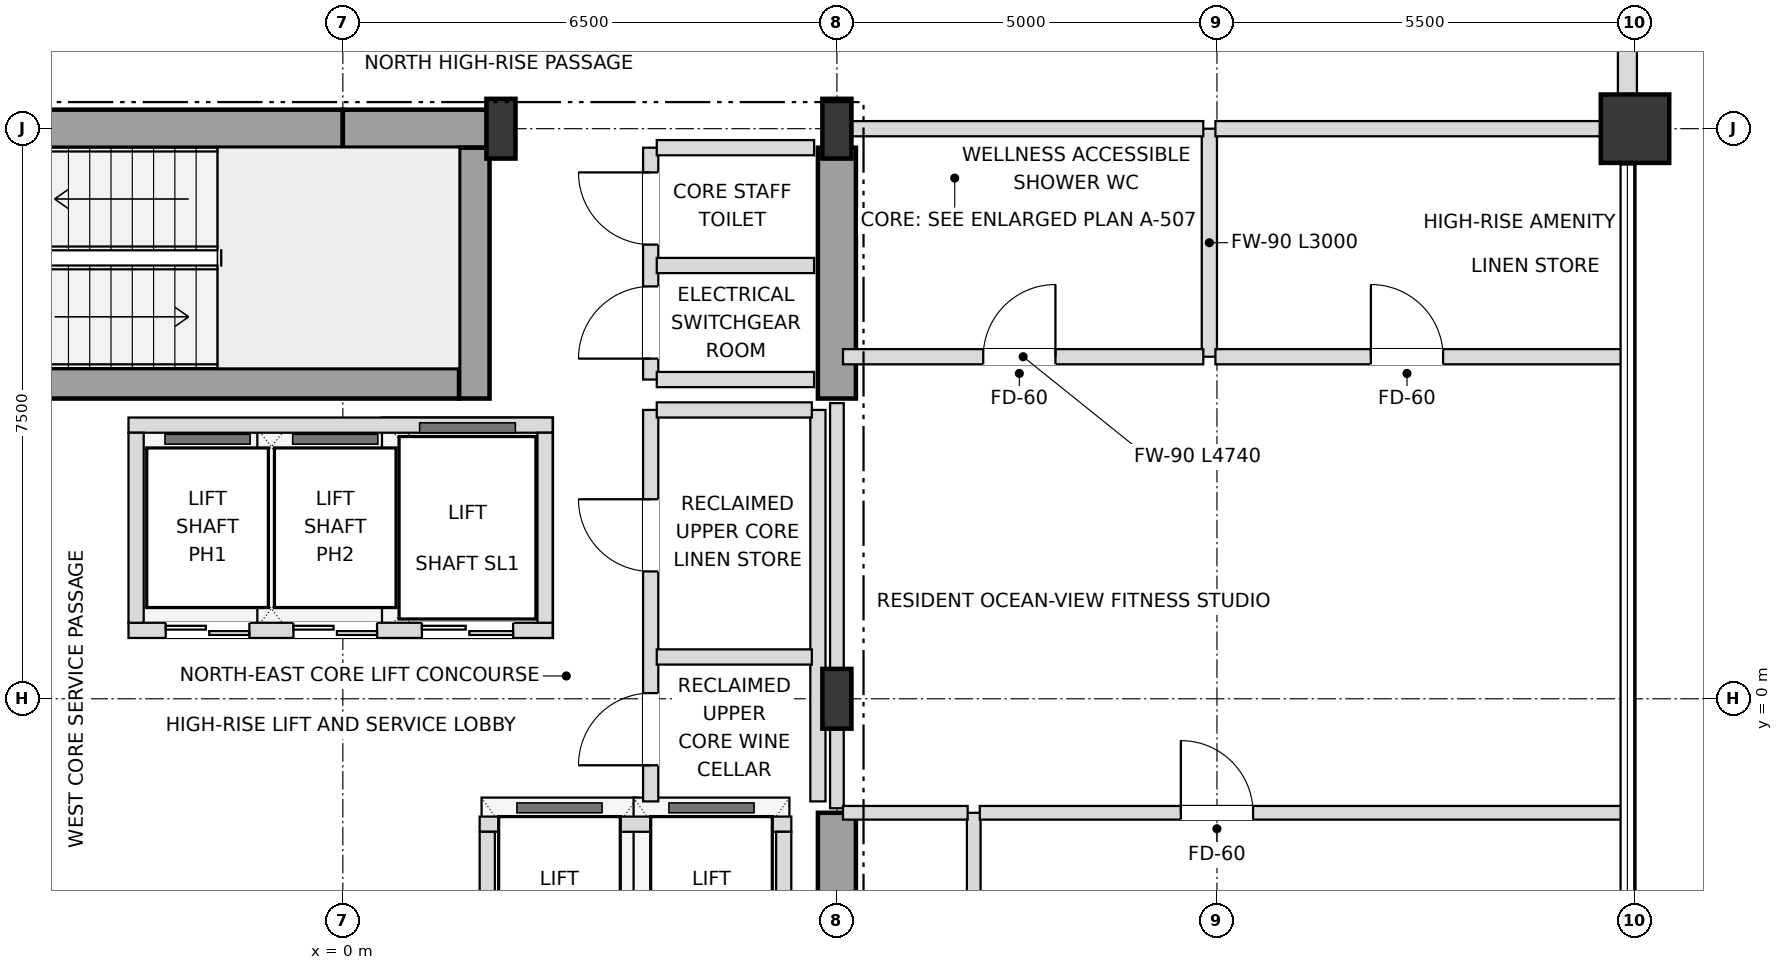
"""IFC4 building model, lengths in metres.
Left out: names, types, materials, properties, quantities, classifications, styles, units other than length and angle.
Written with IfcOpenShell. Run it as: python <this file> out.ifc"""

import sys

from ifc_helpers import new_model, si_unit, direction, frame, frame_2d, origin, origin_2d, place, context, subcontext, project, spatial, rectangle, i_section, extrude, element, fill, save


model = new_model("IFC4")
c1 = context("Model", 3, precision=1e-05, world=origin(), true_north=direction((0.0, 1.0)))
c2 = subcontext(c1, "Body", "Model", "MODEL_VIEW")
j1 = project(units=[si_unit("LENGTHUNIT", "METRE"), si_unit("PLANEANGLEUNIT", "RADIAN")], contexts=[c1])
p1 = place(None, origin())
s1 = spatial("IfcSite", under=j1, at=p1, CompositionType="ELEMENT")
p2 = place(p1, origin())
s2 = spatial("IfcBuilding", under=s1, at=p2, CompositionType="ELEMENT")
p3 = place(p2, frame((0.0, 0.0, 269.1)))
s3 = spatial("IfcBuildingStorey", under=s2, at=p3, CompositionType="ELEMENT", Elevation=269.1)
for number, where, z_axis, x_axis in (
    (1, (6.5, 0.0, 0.0), (0.0, 0.0, 1.0), (1.0, 0.0, 0.0)),
    (2, (2.08, 7.5, 0.0), (0.0, 0.0, 1.0), (1.0, 0.0, 0.0)),
    (3, (6.5, 7.5, 0.0), (0.0, 0.0, 1.0), (1.0, 0.0, 0.0)),
):
    element("IfcColumn", number, at=place(p3, frame(where, z_axis=z_axis, x_axis=x_axis)), inside=s3, PredefinedType="COLUMN", context=c2, shape_type="SweptSolid", body=[
        extrude(i_section(OverallWidth=0.382, OverallDepth=0.786, WebThickness=0.02, FlangeThickness=0.033, at=origin_2d()), origin(), (0.0, 0.0, 1.0), 3.6),
    ])
p4 = place(p3, frame((17.0, 7.5, 0.0), z_axis=(0.0, 0.0, 1.0), x_axis=(1.0, 0.0, 0.0)))
e4 = element("IfcColumn", 4, at=p4, inside=s3, PredefinedType="USERDEFINED", context=c2, shape_type="SweptSolid", body=[
    extrude(rectangle(XDim=0.9, YDim=0.9, at=origin_2d()), origin(), (0.0, 0.0, 1.0), 3.6),
])
p5 = place(p3, frame((16.9, 7.945, 0.0), z_axis=(0.0, 0.0, 1.0), x_axis=(0.0, 1.0, 0.0)))
e5 = element("IfcWall", 5, at=p5, inside=s3, PredefinedType="SOLIDWALL", context=c2, shape_type="SweptSolid", body=[
    extrude(rectangle(XDim=4.61, YDim=0.25, at=frame_2d((2.305, 0.0))), origin(), (0.0, 0.0, 1.0), 2.748),
])
p6 = place(p5, frame((1.405, 0.0, 0.72)))
e6 = element("IfcOpeningElement", 6, at=p6, cuts=e5, PredefinedType="OPENING", context=c2, shape_type="SweptSolid", body=[
    extrude(rectangle(XDim=1.8, YDim=1.68, at=frame_2d((0.9, 0.84))), frame((0.0, 0.135, 0.0), z_axis=(0.0, -1.0, 0.0), x_axis=(1.0, 0.0, 0.0)), (0.0, 0.0, 1.0), 0.27),
])
p7 = place(p3, frame((-6.75, 7.5, 0.0), z_axis=(0.0, 0.0, 1.0), x_axis=(1.0, 0.0, 0.0)))
e7 = element("IfcWall", 7, at=p7, inside=s3, PredefinedType="SHEAR", context=c2, shape_type="SweptSolid", body=[
    extrude(rectangle(XDim=6.75, YDim=0.5, at=frame_2d((3.375, 0.0))), origin(), (0.0, 0.0, 1.0), 3.38),
])
p8 = place(p7, frame((1.65, 0.0, 0.0)))
e8 = element("IfcOpeningElement", 8, at=p8, cuts=e7, PredefinedType="OPENING", context=c2, shape_type="SweptSolid", body=[
    extrude(rectangle(XDim=1.05, YDim=2.15, at=frame_2d((0.525, 1.075))), frame((0.0, 0.26, 0.0), z_axis=(0.0, -1.0, 0.0), x_axis=(1.0, 0.0, 0.0)), (0.0, 0.0, 1.0), 0.52),
])
p9 = place(p3, frame((0.0, 7.5, 0.0), z_axis=(0.0, 0.0, 1.0), x_axis=(1.0, 0.0, 0.0)))
e9 = element("IfcWall", 9, at=p9, inside=s3, PredefinedType="SHEAR", context=c2, shape_type="SweptSolid", body=[
    extrude(rectangle(XDim=2.08, YDim=0.5, at=frame_2d((1.04, 0.0))), origin(), (0.0, 0.0, 1.0), 3.38),
])
p10 = place(p3, frame((6.5, -7.25, 0.0), z_axis=(0.0, 0.0, 1.0), x_axis=(0.0, 1.0, 0.0)))
e10 = element("IfcWall", 10, at=p10, inside=s3, PredefinedType="SHEAR", context=c2, shape_type="SweptSolid", body=[
    extrude(rectangle(XDim=5.75, YDim=0.5, at=frame_2d((2.875, 0.0))), origin(), (0.0, 0.0, 1.0), 3.38),
])
p11 = place(p10, frame((0.85, 0.0, 0.0)))
e11 = element("IfcOpeningElement", 11, at=p11, cuts=e10, PredefinedType="OPENING", context=c2, shape_type="SweptSolid", body=[
    extrude(rectangle(XDim=1.05, YDim=2.15, at=frame_2d((0.525, 1.075))), frame((0.0, 0.26, 0.0), z_axis=(0.0, -1.0, 0.0), x_axis=(1.0, 0.0, 0.0)), (0.0, 0.0, 1.0), 0.52),
])
p12 = place(p3, frame((6.5, 3.95, 0.0), z_axis=(0.0, 0.0, 1.0), x_axis=(0.0, 1.0, 0.0)))
e12 = element("IfcWall", 12, at=p12, inside=s3, PredefinedType="SHEAR", context=c2, shape_type="SweptSolid", body=[
    extrude(rectangle(XDim=3.3, YDim=0.5, at=frame_2d((1.65, 0.0))), origin(), (0.0, 0.0, 1.0), 3.38),
])
p13 = place(p3, frame((-5.55, 4.15, 0.0), z_axis=(0.0, 0.0, 1.0), x_axis=(1.0, 0.0, 0.0)))
e13 = element("IfcWall", 13, at=p13, inside=s3, PredefinedType="SHEAR", context=c2, shape_type="SweptSolid", body=[
    extrude(rectangle(XDim=7.08, YDim=0.4, at=frame_2d((3.54, 0.0))), origin(), (0.0, 0.0, 1.0), 3.38),
])
p14 = place(p3, frame((1.73, 3.95, 0.0), z_axis=(0.0, 0.0, 1.0), x_axis=(0.0, 1.0, 0.0)))
e14 = element("IfcWall", 14, at=p14, inside=s3, PredefinedType="SHEAR", context=c2, shape_type="SweptSolid", body=[
    extrude(rectangle(XDim=3.3, YDim=0.4, at=frame_2d((1.65, 0.0))), origin(), (0.0, 0.0, 1.0), 3.38),
])
p15 = place(p3, frame((-2.82, 0.9, 0.0), z_axis=(0.0, 0.0, 1.0), x_axis=(1.0, 0.0, 0.0)))
e15 = element("IfcWall", 15, at=p15, inside=s3, PredefinedType="SOLIDWALL", context=c2, shape_type="SweptSolid", body=[
    extrude(rectangle(XDim=5.58, YDim=0.2, at=frame_2d((2.79, 0.0))), origin(), (0.0, 0.0, 1.0), 3.38),
])
p16 = place(p15, frame((0.49, 0.0, 0.0)))
e16 = element("IfcOpeningElement", 16, at=p16, cuts=e15, PredefinedType="OPENING", context=c2, shape_type="SweptSolid", body=[
    extrude(rectangle(XDim=1.1, YDim=2.15, at=frame_2d((0.55, 1.075))), frame((0.0, 0.11, 0.0), z_axis=(0.0, -1.0, 0.0), x_axis=(1.0, 0.0, 0.0)), (0.0, 0.0, 1.0), 0.22),
])
p17 = place(p15, frame((2.17, 0.0, 0.0)))
e17 = element("IfcOpeningElement", 17, at=p17, cuts=e15, PredefinedType="OPENING", context=c2, shape_type="SweptSolid", body=[
    extrude(rectangle(XDim=1.1, YDim=2.15, at=frame_2d((0.55, 1.075))), frame((0.0, 0.11, 0.0), z_axis=(0.0, -1.0, 0.0), x_axis=(1.0, 0.0, 0.0)), (0.0, 0.0, 1.0), 0.22),
])
p18 = place(p15, frame((3.86, 0.0, 0.0)))
e18 = element("IfcOpeningElement", 18, at=p18, cuts=e15, PredefinedType="OPENING", context=c2, shape_type="SweptSolid", body=[
    extrude(rectangle(XDim=1.2, YDim=2.2, at=frame_2d((0.6, 1.1))), frame((0.0, 0.11, 0.0), z_axis=(0.0, -1.0, 0.0), x_axis=(1.0, 0.0, 0.0)), (0.0, 0.0, 1.0), 0.22),
])
p19 = place(p3, frame((-2.82, 3.6, 0.0), z_axis=(0.0, 0.0, 1.0), x_axis=(1.0, 0.0, 0.0)))
e19 = element("IfcWall", 19, at=p19, inside=s3, PredefinedType="SOLIDWALL", context=c2, shape_type="SweptSolid", body=[
    extrude(rectangle(XDim=5.58, YDim=0.2, at=frame_2d((2.79, 0.0))), origin(), (0.0, 0.0, 1.0), 3.38),
])
for number, where, z_axis, x_axis in (
    (20, (-2.72, 1.0, 0.0), (0.0, 0.0, 1.0), (0.0, 1.0, 0.0)),
    (21, (2.66, 1.0, 0.0), (0.0, 0.0, 1.0), (0.0, 1.0, 0.0)),
):
    element("IfcWall", number, at=place(p3, frame(where, z_axis=z_axis, x_axis=x_axis)), inside=s3, PredefinedType="SOLIDWALL", context=c2, shape_type="SweptSolid", body=[
        extrude(rectangle(XDim=2.5, YDim=0.2, at=frame_2d((1.25, 0.0))), origin(), (0.0, 0.0, 1.0), 3.38),
    ])
p20 = place(p3, frame((1.8, -1.65, 0.0), z_axis=(0.0, 0.0, 1.0), x_axis=(1.0, 0.0, 0.0)))
e22 = element("IfcWall", 22, at=p20, inside=s3, PredefinedType="SOLIDWALL", context=c2, shape_type="SweptSolid", body=[
    extrude(rectangle(XDim=4.1, YDim=0.2, at=frame_2d((2.05, 0.0))), origin(), (0.0, 0.0, 1.0), 3.38),
])
for number, where, z_axis, x_axis in (
    (23, (1.9, -3.75, 0.0), (0.0, 0.0, 1.0), (0.0, 1.0, 0.0)),
    (24, (5.8, -3.75, 0.0), (0.0, 0.0, 1.0), (0.0, 1.0, 0.0)),
):
    element("IfcWall", number, at=place(p3, frame(where, z_axis=z_axis, x_axis=x_axis)), inside=s3, PredefinedType="SOLIDWALL", context=c2, shape_type="SweptSolid", body=[
        extrude(rectangle(XDim=2.0, YDim=0.2, at=frame_2d((1.0, 0.0))), origin(), (0.0, 0.0, 1.0), 3.38),
    ])
p21 = place(p3, frame((4.05, -1.35, 0.0), z_axis=(0.0, 0.0, 1.0), x_axis=(0.0, 1.0, 0.0)))
e25 = element("IfcWall", 25, at=p21, inside=s3, PredefinedType="SOLIDWALL", context=c2, shape_type="SweptSolid", body=[
    extrude(rectangle(XDim=5.15, YDim=0.2, at=frame_2d((2.575, 0.0))), origin(), (0.0, 0.0, 1.0), 3.38),
])
p22 = place(p21, frame((0.475, 0.0, 0.0)))
e26 = element("IfcOpeningElement", 26, at=p22, cuts=e25, PredefinedType="OPENING", context=c2, shape_type="SweptSolid", body=[
    extrude(rectangle(XDim=0.95, YDim=2.15, at=frame_2d((0.475, 1.075))), frame((0.0, 0.11, 0.0), z_axis=(0.0, -1.0, 0.0), x_axis=(1.0, 0.0, 0.0)), (0.0, 0.0, 1.0), 0.22),
])
p23 = place(p21, frame((3.025, 0.0, 0.0)))
e27 = element("IfcOpeningElement", 27, at=p23, cuts=e25, PredefinedType="OPENING", context=c2, shape_type="SweptSolid", body=[
    extrude(rectangle(XDim=0.95, YDim=2.15, at=frame_2d((0.475, 1.075))), frame((0.0, 0.11, 0.0), z_axis=(0.0, -1.0, 0.0), x_axis=(1.0, 0.0, 0.0)), (0.0, 0.0, 1.0), 0.22),
])
p24 = place(p3, frame((4.05, 4.2, 0.0), z_axis=(0.0, 0.0, 1.0), x_axis=(0.0, 1.0, 0.0)))
e28 = element("IfcWall", 28, at=p24, inside=s3, PredefinedType="SOLIDWALL", context=c2, shape_type="SweptSolid", body=[
    extrude(rectangle(XDim=3.05, YDim=0.2, at=frame_2d((1.525, 0.0))), origin(), (0.0, 0.0, 1.0), 3.38),
])
p25 = place(p24, frame((0.275, 0.0, 0.0)))
e29 = element("IfcOpeningElement", 29, at=p25, cuts=e28, PredefinedType="OPENING", context=c2, shape_type="SweptSolid", body=[
    extrude(rectangle(XDim=0.95, YDim=2.15, at=frame_2d((0.475, 1.075))), frame((0.0, 0.11, 0.0), z_axis=(0.0, -1.0, 0.0), x_axis=(1.0, 0.0, 0.0)), (0.0, 0.0, 1.0), 0.22),
])
p26 = place(p24, frame((1.775, 0.0, 0.0)))
e30 = element("IfcOpeningElement", 30, at=p26, cuts=e28, PredefinedType="OPENING", context=c2, shape_type="SweptSolid", body=[
    extrude(rectangle(XDim=0.95, YDim=2.15, at=frame_2d((0.475, 1.075))), frame((0.0, 0.11, 0.0), z_axis=(0.0, -1.0, 0.0), x_axis=(1.0, 0.0, 0.0)), (0.0, 0.0, 1.0), 0.22),
])
p27 = place(p3, frame((6.25, -1.35, 0.0), z_axis=(0.0, 0.0, 1.0), x_axis=(0.0, 1.0, 0.0)))
e31 = element("IfcWall", 31, at=p27, inside=s3, PredefinedType="SOLIDWALL", context=c2, shape_type="SweptSolid", body=[
    extrude(rectangle(XDim=5.15, YDim=0.2, at=frame_2d((2.575, 0.0))), origin(), (0.0, 0.0, 1.0), 3.38),
])
p28 = place(p3, frame((6.5, -1.44, 0.0), z_axis=(0.0, 0.0, 1.0), x_axis=(0.0, 1.0, 0.0)))
e32 = element("IfcWall", 32, at=p28, inside=s3, PredefinedType="PARTITIONING", context=c2, shape_type="SweptSolid", body=[
    extrude(rectangle(XDim=5.33, YDim=0.18, at=frame_2d((2.665, 0.0))), origin(), (0.0, 0.0, 1.0), 2.826),
])
p29 = place(p3, frame((8.3, -7.5, 0.0), z_axis=(0.0, 0.0, 1.0), x_axis=(0.0, 1.0, 0.0)))
e33 = element("IfcWall", 33, at=p29, inside=s3, PredefinedType="PARTITIONING", context=c2, shape_type="SweptSolid", body=[
    extrude(rectangle(XDim=6.0, YDim=0.18, at=frame_2d((3.0, 0.0))), origin(), (0.0, 0.0, 1.0), 3.38),
])
p30 = place(p29, frame((1.425, 0.0, 0.0)))
e34 = element("IfcOpeningElement", 34, at=p30, cuts=e33, PredefinedType="OPENING", context=c2, shape_type="SweptSolid", body=[
    extrude(rectangle(XDim=0.95, YDim=2.15, at=frame_2d((0.475, 1.075))), frame((0.0, 0.1, 0.0), z_axis=(0.0, -1.0, 0.0), x_axis=(1.0, 0.0, 0.0)), (0.0, 0.0, 1.0), 0.2),
])
p31 = place(p3, frame((11.4, 4.5, 0.0), z_axis=(0.0, 0.0, 1.0), x_axis=(0.0, 1.0, 0.0)))
e35 = element("IfcWall", 35, at=p31, inside=s3, PredefinedType="SOLIDWALL", context=c2, shape_type="SweptSolid", body=[
    extrude(rectangle(XDim=3.0, YDim=0.2, at=frame_2d((1.5, 0.0))), origin(), (0.0, 0.0, 1.0), 3.018),
])
p32 = place(p3, frame((6.58, -1.5, 0.0), z_axis=(0.0, 0.0, 1.0), x_axis=(1.0, 0.0, 0.0)))
e36 = element("IfcWall", 36, at=p32, inside=s3, PredefinedType="PARTITIONING", context=c2, shape_type="SweptSolid", body=[
    extrude(rectangle(XDim=1.64, YDim=0.18, at=frame_2d((0.82, 0.0))), origin(), (0.0, 0.0, 1.0), 3.38),
])
p33 = place(p3, frame((8.38, -1.5, 0.0), z_axis=(0.0, 0.0, 1.0), x_axis=(1.0, 0.0, 0.0)))
e37 = element("IfcWall", 37, at=p33, inside=s3, PredefinedType="PARTITIONING", context=c2, shape_type="SweptSolid", body=[
    extrude(rectangle(XDim=8.44, YDim=0.18, at=frame_2d((4.22, 0.0))), origin(), (0.0, 0.0, 1.0), 3.018),
])
p34 = place(p33, frame((2.645, 0.0, 0.0)))
e38 = element("IfcOpeningElement", 38, at=p34, cuts=e37, PredefinedType="OPENING", context=c2, shape_type="SweptSolid", body=[
    extrude(rectangle(XDim=0.95, YDim=2.15, at=frame_2d((0.475, 1.075))), frame((0.0, 0.1, 0.0), z_axis=(0.0, -1.0, 0.0), x_axis=(1.0, 0.0, 0.0)), (0.0, 0.0, 1.0), 0.2),
])
for number, where, z_axis, x_axis in (
    (39, (4.13, 0.55, 0.0), (0.0, 0.0, 1.0), (1.0, 0.0, 0.0)),
    (40, (4.13, 3.8, 0.0), (0.0, 0.0, 1.0), (1.0, 0.0, 0.0)),
):
    element("IfcWall", number, at=place(p3, frame(where, z_axis=z_axis, x_axis=x_axis)), inside=s3, PredefinedType="SOLIDWALL", context=c2, shape_type="SweptSolid", body=[
        extrude(rectangle(XDim=2.04, YDim=0.2, at=frame_2d((1.02, 0.0))), origin(), (0.0, 0.0, 1.0), 3.38),
    ])
p35 = place(p3, frame((4.13, 4.2, 0.0), z_axis=(0.0, 0.0, 1.0), x_axis=(1.0, 0.0, 0.0)))
e41 = element("IfcWall", 41, at=p35, inside=s3, PredefinedType="SOLIDWALL", context=c2, shape_type="SweptSolid", body=[
    extrude(rectangle(XDim=2.07, YDim=0.2, at=frame_2d((1.035, 0.0))), origin(), (0.0, 0.0, 1.0), 3.38),
])
p36 = place(p3, frame((6.58, 4.5, 0.0), z_axis=(0.0, 0.0, 1.0), x_axis=(1.0, 0.0, 0.0)))
e42 = element("IfcWall", 42, at=p36, inside=s3, PredefinedType="SOLIDWALL", context=c2, shape_type="SweptSolid", body=[
    extrude(rectangle(XDim=4.74, YDim=0.2, at=frame_2d((2.37, 0.0))), origin(), (0.0, 0.0, 1.0), 3.38),
])
p37 = place(p36, frame((1.845, 0.0, 0.0)))
e43 = element("IfcOpeningElement", 43, at=p37, cuts=e42, PredefinedType="OPENING", context=c2, shape_type="SweptSolid", body=[
    extrude(rectangle(XDim=0.95, YDim=2.15, at=frame_2d((0.475, 1.075))), frame((0.0, 0.11, 0.0), z_axis=(0.0, -1.0, 0.0), x_axis=(1.0, 0.0, 0.0)), (0.0, 0.0, 1.0), 0.22),
])
p38 = place(p3, frame((11.48, 4.5, 0.0), z_axis=(0.0, 0.0, 1.0), x_axis=(1.0, 0.0, 0.0)))
e44 = element("IfcWall", 44, at=p38, inside=s3, PredefinedType="SOLIDWALL", context=c2, shape_type="SweptSolid", body=[
    extrude(rectangle(XDim=5.34, YDim=0.2, at=frame_2d((2.67, 0.0))), origin(), (0.0, 0.0, 1.0), 3.38),
])
p39 = place(p38, frame((2.045, 0.0, 0.0)))
e45 = element("IfcOpeningElement", 45, at=p39, cuts=e44, PredefinedType="OPENING", context=c2, shape_type="SweptSolid", body=[
    extrude(rectangle(XDim=0.95, YDim=2.15, at=frame_2d((0.475, 1.075))), frame((0.0, 0.11, 0.0), z_axis=(0.0, -1.0, 0.0), x_axis=(1.0, 0.0, 0.0)), (0.0, 0.0, 1.0), 0.22),
])
for number, where, z_axis, x_axis in (
    (46, (4.13, 5.7, 0.0), (0.0, 0.0, 1.0), (1.0, 0.0, 0.0)),
    (47, (4.13, 7.25, 0.0), (0.0, 0.0, 1.0), (1.0, 0.0, 0.0)),
):
    element("IfcWall", number, at=place(p3, frame(where, z_axis=z_axis, x_axis=x_axis)), inside=s3, PredefinedType="SOLIDWALL", context=c2, shape_type="SweptSolid", body=[
        extrude(rectangle(XDim=2.07, YDim=0.2, at=frame_2d((1.035, 0.0))), origin(), (0.0, 0.0, 1.0), 3.38),
    ])
p40 = place(p3, frame((6.5, 7.5, 0.0), z_axis=(0.0, 0.0, 1.0), x_axis=(1.0, 0.0, 0.0)))
e48 = element("IfcWall", 48, at=p40, inside=s3, PredefinedType="SOLIDWALL", context=c2, shape_type="SweptSolid", body=[
    extrude(rectangle(XDim=4.82, YDim=0.2, at=frame_2d((2.41, 0.0))), origin(), (0.0, 0.0, 1.0), 2.826),
])
p41 = place(p3, frame((11.48, 7.5, 0.0), z_axis=(0.0, 0.0, 1.0), x_axis=(1.0, 0.0, 0.0)))
e49 = element("IfcWall", 49, at=p41, inside=s3, PredefinedType="SOLIDWALL", context=c2, shape_type="SweptSolid", body=[
    extrude(rectangle(XDim=5.42, YDim=0.2, at=frame_2d((2.71, 0.0))), origin(), (0.0, 0.0, 1.0), 2.826),
])
p42 = place(p16, origin())
e50 = element("IfcDoor", 50, at=p42, inside=s3, OperationType="DOUBLE_DOOR_SLIDING", PredefinedType="DOOR", context=c2, shape_type="SweptSolid", body=[
    extrude(rectangle(XDim=1.1, YDim=2.15, at=frame_2d((0.55, 1.075))), frame((0.0, 0.025, 0.0), z_axis=(0.0, -1.0, 0.0), x_axis=(1.0, 0.0, 0.0)), (0.0, 0.0, 1.0), 0.05),
])
fill(e16, e50)
p43 = place(p17, origin())
e51 = element("IfcDoor", 51, at=p43, inside=s3, OperationType="DOUBLE_DOOR_SLIDING", PredefinedType="DOOR", context=c2, shape_type="SweptSolid", body=[
    extrude(rectangle(XDim=1.1, YDim=2.15, at=frame_2d((0.55, 1.075))), frame((0.0, 0.025, 0.0), z_axis=(0.0, -1.0, 0.0), x_axis=(1.0, 0.0, 0.0)), (0.0, 0.0, 1.0), 0.05),
])
fill(e17, e51)
p44 = place(p18, origin())
e52 = element("IfcDoor", 52, at=p44, inside=s3, OperationType="DOUBLE_DOOR_SLIDING", PredefinedType="DOOR", context=c2, shape_type="SweptSolid", body=[
    extrude(rectangle(XDim=1.2, YDim=2.2, at=frame_2d((0.6, 1.1))), frame((0.0, 0.025, 0.0), z_axis=(0.0, -1.0, 0.0), x_axis=(1.0, 0.0, 0.0)), (0.0, 0.0, 1.0), 0.05),
])
fill(e18, e52)
p45 = place(p22, origin())
e53 = element("IfcDoor", 53, at=p45, inside=s3, OperationType="SINGLE_SWING_LEFT", PredefinedType="DOOR", context=c2, shape_type="SweptSolid", body=[
    extrude(rectangle(XDim=0.95, YDim=2.15, at=frame_2d((0.475, 1.075))), frame((0.0, 0.025, 0.0), z_axis=(0.0, -1.0, 0.0), x_axis=(1.0, 0.0, 0.0)), (0.0, 0.0, 1.0), 0.05),
])
fill(e26, e53)
p46 = place(p23, origin())
e54 = element("IfcDoor", 54, at=p46, inside=s3, OperationType="SINGLE_SWING_RIGHT", PredefinedType="DOOR", context=c2, shape_type="SweptSolid", body=[
    extrude(rectangle(XDim=0.95, YDim=2.15, at=frame_2d((0.475, 1.075))), frame((0.0, 0.025, 0.0), z_axis=(0.0, -1.0, 0.0), x_axis=(1.0, 0.0, 0.0)), (0.0, 0.0, 1.0), 0.05),
])
fill(e27, e54)
p47 = place(p25, origin())
e55 = element("IfcDoor", 55, at=p47, inside=s3, OperationType="SINGLE_SWING_LEFT", PredefinedType="DOOR", context=c2, shape_type="SweptSolid", body=[
    extrude(rectangle(XDim=0.95, YDim=2.15, at=frame_2d((0.475, 1.075))), frame((0.0, 0.025, 0.0), z_axis=(0.0, -1.0, 0.0), x_axis=(1.0, 0.0, 0.0)), (0.0, 0.0, 1.0), 0.05),
])
fill(e29, e55)
p48 = place(p26, origin())
e56 = element("IfcDoor", 56, at=p48, inside=s3, OperationType="SINGLE_SWING_RIGHT", PredefinedType="DOOR", context=c2, shape_type="SweptSolid", body=[
    extrude(rectangle(XDim=0.95, YDim=2.15, at=frame_2d((0.475, 1.075))), frame((0.0, 0.025, 0.0), z_axis=(0.0, -1.0, 0.0), x_axis=(1.0, 0.0, 0.0)), (0.0, 0.0, 1.0), 0.05),
])
fill(e30, e56)
p49 = place(p34, origin())
e57 = element("IfcDoor", 57, at=p49, inside=s3, OperationType="SINGLE_SWING_LEFT", PredefinedType="DOOR", context=c2, shape_type="SweptSolid", body=[
    extrude(rectangle(XDim=0.95, YDim=2.15, at=frame_2d((0.475, 1.075))), frame((0.0, 0.025, 0.0), z_axis=(0.0, -1.0, 0.0), x_axis=(1.0, 0.0, 0.0)), (0.0, 0.0, 1.0), 0.05),
])
fill(e38, e57)
p50 = place(p37, origin())
e58 = element("IfcDoor", 58, at=p50, inside=s3, OperationType="SINGLE_SWING_RIGHT", PredefinedType="DOOR", context=c2, shape_type="SweptSolid", body=[
    extrude(rectangle(XDim=0.95, YDim=2.15, at=frame_2d((0.475, 1.075))), frame((0.0, 0.025, 0.0), z_axis=(0.0, -1.0, 0.0), x_axis=(1.0, 0.0, 0.0)), (0.0, 0.0, 1.0), 0.05),
])
fill(e43, e58)
p51 = place(p39, origin())
e59 = element("IfcDoor", 59, at=p51, inside=s3, OperationType="SINGLE_SWING_LEFT", PredefinedType="DOOR", context=c2, shape_type="SweptSolid", body=[
    extrude(rectangle(XDim=0.95, YDim=2.15, at=frame_2d((0.475, 1.075))), frame((0.0, 0.025, 0.0), z_axis=(0.0, -1.0, 0.0), x_axis=(1.0, 0.0, 0.0)), (0.0, 0.0, 1.0), 0.05),
])
fill(e45, e59)
save(model, sys.argv[1])
